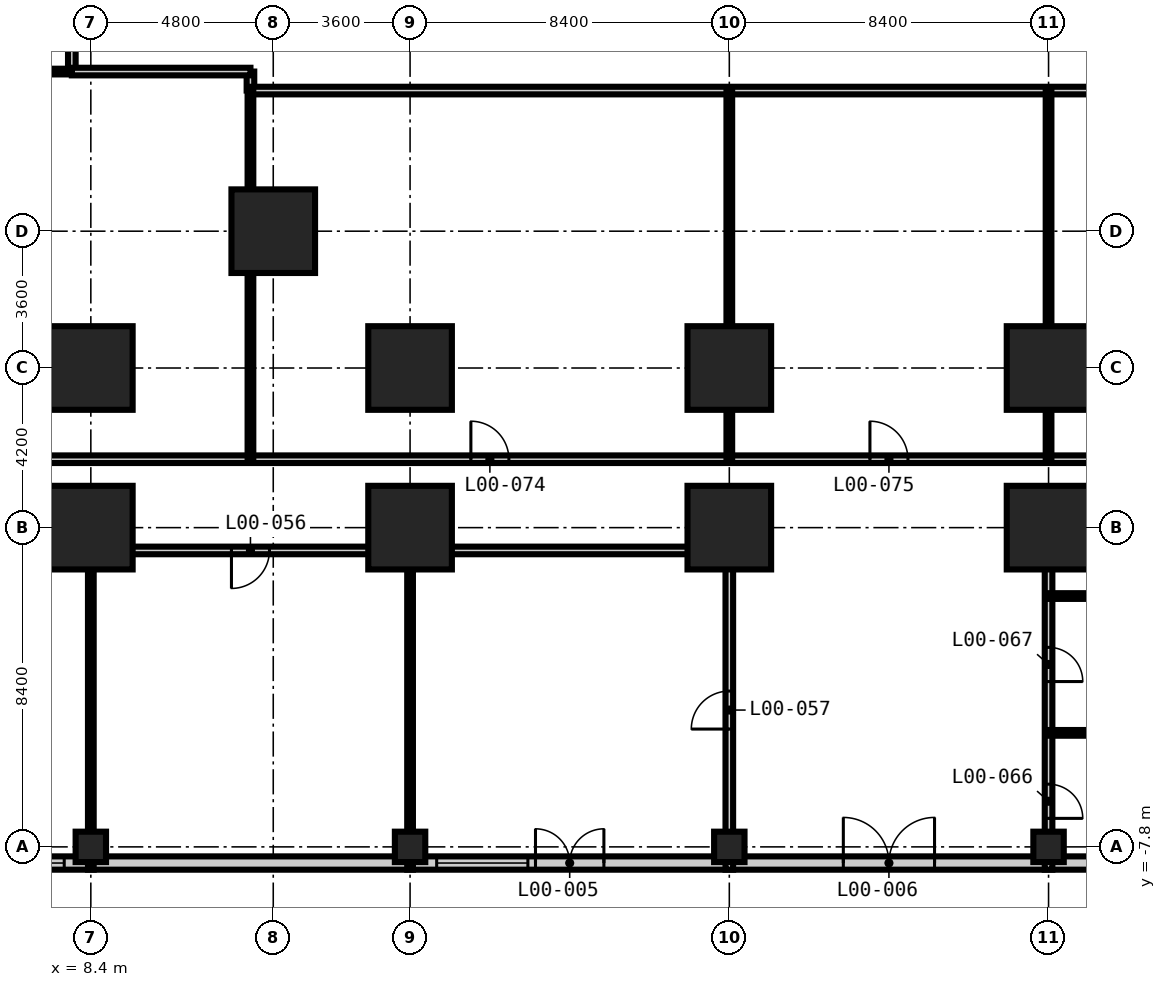
"""IFC4 building model, lengths in metres.
Left out: names, types, materials, properties, quantities, classifications, styles, units other than length and angle.
Written with IfcOpenShell. Run it as: python <this file> out.ifc"""

import sys

from ifc_helpers import new_model, si_unit, direction, frame, frame_2d, origin, origin_with_axes, origin_2d, place, context, subcontext, project, spatial, rectangle, extrude, element, fill, save


model = new_model("IFC4")
c1 = context("Model", 3, precision=1e-05, world=origin(), true_north=direction((0.0, 1.0)))
c2 = subcontext(c1, "Body", "Model", "MODEL_VIEW")
j1 = project(units=[si_unit("LENGTHUNIT", "METRE"), si_unit("PLANEANGLEUNIT", "RADIAN")], contexts=[c1])
p1 = place(None, origin())
s1 = spatial("IfcSite", under=j1, at=p1, CompositionType="ELEMENT")
p2 = place(p1, origin())
s2 = spatial("IfcBuilding", under=s1, at=p2, CompositionType="ELEMENT")
p3 = place(p2, origin())
s3 = spatial("IfcBuildingStorey", under=s2, at=p3, CompositionType="ELEMENT", Elevation=0.0)
for number, where, z_axis, x_axis in (
    (1, (8.4, 0.6, -0.3), (0.0, 0.0, 1.0), (1.0, 0.0, 0.0)),
    (2, (8.4, 4.8, -0.3), (0.0, 0.0, 1.0), (1.0, 0.0, 0.0)),
    (3, (13.2, 8.4, -0.3), (0.0, 0.0, 1.0), (1.0, 0.0, 0.0)),
    (4, (16.8, 0.6, -0.3), (0.0, 0.0, 1.0), (1.0, 0.0, 0.0)),
    (5, (16.8, 4.8, -0.3), (0.0, 0.0, 1.0), (1.0, 0.0, 0.0)),
    (6, (25.2, 0.6, -0.3), (0.0, 0.0, 1.0), (1.0, 0.0, 0.0)),
    (7, (25.2, 4.8, -0.3), (0.0, 0.0, 1.0), (1.0, 0.0, 0.0)),
    (8, (33.6, 0.6, -0.3), (0.0, 0.0, 1.0), (1.0, 0.0, 0.0)),
    (9, (33.6, 4.8, -0.3), (0.0, 0.0, 1.0), (1.0, 0.0, 0.0)),
):
    element("IfcColumn", number, at=place(p3, frame(where, z_axis=z_axis, x_axis=x_axis)), inside=s3, PredefinedType="COLUMN", context=c2, shape_type="SweptSolid", body=[
        extrude(rectangle(XDim=2.2, YDim=2.2, at=origin_2d()), origin(), (0.0, 0.0, 1.0), 6.0),
    ])
for number, where, z_axis, x_axis in (
    (10, (8.4, -7.8, -0.3), (0.0, 0.0, 1.0), (1.0, 0.0, 0.0)),
    (11, (16.8, -7.8, -0.3), (0.0, 0.0, 1.0), (1.0, 0.0, 0.0)),
    (12, (25.2, -7.8, -0.3), (0.0, 0.0, 1.0), (1.0, 0.0, 0.0)),
    (13, (33.6, -7.8, -0.3), (0.0, 0.0, 1.0), (1.0, 0.0, 0.0)),
):
    element("IfcColumn", number, at=place(p3, frame(where, z_axis=z_axis, x_axis=x_axis)), inside=s3, PredefinedType="COLUMN", context=c2, shape_type="SweptSolid", body=[
        extrude(rectangle(XDim=0.8, YDim=0.8, at=origin_2d()), origin(), (0.0, 0.0, 1.0), 6.0),
    ])
p4 = place(p3, frame((-33.6, -8.225, 0.0), z_axis=(0.0, 0.0, 1.0), x_axis=(1.0, 0.0, 0.0)))
e14 = element("IfcWall", 14, at=p4, inside=s3, PredefinedType="SOLIDWALL", context=c2, shape_type="SweptSolid", body=[
    extrude(rectangle(XDim=92.4, YDim=0.35, at=frame_2d((46.2, 0.0))), origin(), (0.0, 0.0, 1.0), 5.7),
])
p5 = place(p4, frame((5.4, 0.0, 0.0)))
e15 = element("IfcOpeningElement", 15, at=p5, cuts=e14, PredefinedType="OPENING", context=c2, shape_type="SweptSolid", body=[
    extrude(rectangle(XDim=1.8, YDim=2.7, at=frame_2d((0.9, 1.35))), frame((0.0, 0.185, 0.0), z_axis=(0.0, -1.0, 0.0), x_axis=(1.0, 0.0, 0.0)), (0.0, 0.0, 1.0), 0.37),
])
p6 = place(p4, frame((2.8, 0.0, 0.9)))
e16 = element("IfcOpeningElement", 16, at=p6, cuts=e14, PredefinedType="OPENING", context=c2, shape_type="SweptSolid", body=[
    extrude(rectangle(XDim=2.4, YDim=2.4, at=frame_2d((1.2, 1.2))), frame((0.0, 0.185, 0.0), z_axis=(0.0, -1.0, 0.0), x_axis=(1.0, 0.0, 0.0)), (0.0, 0.0, 1.0), 0.37),
])
p7 = place(p4, frame((9.3, 0.0, 0.9)))
e17 = element("IfcOpeningElement", 17, at=p7, cuts=e14, PredefinedType="OPENING", context=c2, shape_type="SweptSolid", body=[
    extrude(rectangle(XDim=2.4, YDim=2.4, at=frame_2d((1.2, 1.2))), frame((0.0, 0.185, 0.0), z_axis=(0.0, -1.0, 0.0), x_axis=(1.0, 0.0, 0.0)), (0.0, 0.0, 1.0), 0.37),
])
p8 = place(p4, frame((13.8, 0.0, 0.9)))
e18 = element("IfcOpeningElement", 18, at=p8, cuts=e14, PredefinedType="OPENING", context=c2, shape_type="SweptSolid", body=[
    extrude(rectangle(XDim=2.4, YDim=2.4, at=frame_2d((1.2, 1.2))), frame((0.0, 0.185, 0.0), z_axis=(0.0, -1.0, 0.0), x_axis=(1.0, 0.0, 0.0)), (0.0, 0.0, 1.0), 0.37),
])
p9 = place(p4, frame((19.3, 0.0, 0.0)))
e19 = element("IfcOpeningElement", 19, at=p9, cuts=e14, PredefinedType="OPENING", context=c2, shape_type="SweptSolid", body=[
    extrude(rectangle(XDim=1.2, YDim=2.4, at=frame_2d((0.6, 1.2))), frame((0.0, 0.185, 0.0), z_axis=(0.0, -1.0, 0.0), x_axis=(1.0, 0.0, 0.0)), (0.0, 0.0, 1.0), 0.37),
])
p10 = place(p4, frame((26.8, 0.0, 0.0)))
e20 = element("IfcOpeningElement", 20, at=p10, cuts=e14, PredefinedType="OPENING", context=c2, shape_type="SweptSolid", body=[
    extrude(rectangle(XDim=2.4, YDim=3.0, at=frame_2d((1.2, 1.5))), frame((0.0, 0.185, 0.0), z_axis=(0.0, -1.0, 0.0), x_axis=(1.0, 0.0, 0.0)), (0.0, 0.0, 1.0), 0.37),
])
p11 = place(p4, frame((36.9, 0.0, 0.0)))
e21 = element("IfcOpeningElement", 21, at=p11, cuts=e14, PredefinedType="OPENING", context=c2, shape_type="SweptSolid", body=[
    extrude(rectangle(XDim=1.8, YDim=2.4, at=frame_2d((0.9, 1.2))), frame((0.0, 0.185, 0.0), z_axis=(0.0, -1.0, 0.0), x_axis=(1.0, 0.0, 0.0)), (0.0, 0.0, 1.0), 0.37),
])
p12 = place(p4, frame((38.9, 0.0, 0.9)))
e22 = element("IfcOpeningElement", 22, at=p12, cuts=e14, PredefinedType="OPENING", context=c2, shape_type="SweptSolid", body=[
    extrude(rectangle(XDim=2.4, YDim=2.4, at=frame_2d((1.2, 1.2))), frame((0.0, 0.185, 0.0), z_axis=(0.0, -1.0, 0.0), x_axis=(1.0, 0.0, 0.0)), (0.0, 0.0, 1.0), 0.37),
])
p13 = place(p4, frame((53.7, 0.0, 0.0)))
e23 = element("IfcOpeningElement", 23, at=p13, cuts=e14, PredefinedType="OPENING", context=c2, shape_type="SweptSolid", body=[
    extrude(rectangle(XDim=1.8, YDim=2.4, at=frame_2d((0.9, 1.2))), frame((0.0, 0.185, 0.0), z_axis=(0.0, -1.0, 0.0), x_axis=(1.0, 0.0, 0.0)), (0.0, 0.0, 1.0), 0.37),
])
p14 = place(p4, frame((51.1, 0.0, 0.9)))
e24 = element("IfcOpeningElement", 24, at=p14, cuts=e14, PredefinedType="OPENING", context=c2, shape_type="SweptSolid", body=[
    extrude(rectangle(XDim=2.4, YDim=2.4, at=frame_2d((1.2, 1.2))), frame((0.0, 0.185, 0.0), z_axis=(0.0, -1.0, 0.0), x_axis=(1.0, 0.0, 0.0)), (0.0, 0.0, 1.0), 0.37),
])
p15 = place(p4, frame((61.8, 0.0, 0.0)))
e25 = element("IfcOpeningElement", 25, at=p15, cuts=e14, PredefinedType="OPENING", context=c2, shape_type="SweptSolid", body=[
    extrude(rectangle(XDim=2.4, YDim=3.0, at=frame_2d((1.2, 1.5))), frame((0.0, 0.185, 0.0), z_axis=(0.0, -1.0, 0.0), x_axis=(1.0, 0.0, 0.0)), (0.0, 0.0, 1.0), 0.37),
])
p16 = place(p4, frame((72.7, 0.0, 0.9)))
e26 = element("IfcOpeningElement", 26, at=p16, cuts=e14, PredefinedType="OPENING", context=c2, shape_type="SweptSolid", body=[
    extrude(rectangle(XDim=2.4, YDim=2.4, at=frame_2d((1.2, 1.2))), frame((0.0, 0.185, 0.0), z_axis=(0.0, -1.0, 0.0), x_axis=(1.0, 0.0, 0.0)), (0.0, 0.0, 1.0), 0.37),
])
p17 = place(p4, frame((81.1, 0.0, 0.9)))
e27 = element("IfcOpeningElement", 27, at=p17, cuts=e14, PredefinedType="OPENING", context=c2, shape_type="SweptSolid", body=[
    extrude(rectangle(XDim=2.4, YDim=2.4, at=frame_2d((1.2, 1.2))), frame((0.0, 0.185, 0.0), z_axis=(0.0, -1.0, 0.0), x_axis=(1.0, 0.0, 0.0)), (0.0, 0.0, 1.0), 0.37),
])
p18 = place(p4, frame((88.9, 0.0, 0.9)))
e28 = element("IfcOpeningElement", 28, at=p18, cuts=e14, PredefinedType="OPENING", context=c2, shape_type="SweptSolid", body=[
    extrude(rectangle(XDim=2.4, YDim=2.4, at=frame_2d((1.2, 1.2))), frame((0.0, 0.185, 0.0), z_axis=(0.0, -1.0, 0.0), x_axis=(1.0, 0.0, 0.0)), (0.0, 0.0, 1.0), 0.37),
])
p19 = place(p3, frame((7.9, 12.6, 0.0), z_axis=(0.0, 0.0, 1.0), x_axis=(0.0, 1.0, 0.0)))
e29 = element("IfcWall", 29, at=p19, inside=s3, PredefinedType="PARTITIONING", context=c2, shape_type="SweptSolid", body=[
    extrude(rectangle(XDim=8.4, YDim=0.2, at=frame_2d((4.2, 0.0))), origin(), (0.0, 0.0, 1.0), 5.7),
])
p20 = place(p19, frame((3.3, 0.0, 0.0)))
e30 = element("IfcOpeningElement", 30, at=p20, cuts=e29, PredefinedType="OPENING", context=c2, shape_type="SweptSolid", body=[
    extrude(rectangle(XDim=1.8, YDim=2.4, at=frame_2d((0.9, 1.2))), frame((0.0, 0.11, 0.0), z_axis=(0.0, -1.0, 0.0), x_axis=(1.0, 0.0, 0.0)), (0.0, 0.0, 1.0), 0.22),
])
p21 = place(p3, frame((12.6, 12.1, 0.0), z_axis=(0.0, 0.0, 1.0), x_axis=(0.0, 1.0, 0.0)))
e31 = element("IfcWall", 31, at=p21, inside=s3, PredefinedType="PARTITIONING", context=c2, shape_type="SweptSolid", body=[
    extrude(rectangle(XDim=0.5, YDim=0.2, at=frame_2d((0.25, 0.0))), origin(), (0.0, 0.0, 1.0), 5.7),
])
p22 = place(p3, frame((25.2, -8.4, 0.0), z_axis=(0.0, 0.0, 1.0), x_axis=(0.0, 1.0, 0.0)))
e32 = element("IfcWall", 32, at=p22, inside=s3, PredefinedType="PARTITIONING", context=c2, shape_type="SweptSolid", body=[
    extrude(rectangle(XDim=8.4, YDim=0.2, at=frame_2d((4.2, 0.0))), origin(), (0.0, 0.0, 1.0), 5.7),
])
p23 = place(p22, frame((3.7, 0.0, 0.0)))
e33 = element("IfcOpeningElement", 33, at=p23, cuts=e32, PredefinedType="OPENING", context=c2, shape_type="SweptSolid", body=[
    extrude(rectangle(XDim=1.0, YDim=2.1, at=frame_2d((0.5, 1.05))), frame((0.0, 0.11, 0.0), z_axis=(0.0, -1.0, 0.0), x_axis=(1.0, 0.0, 0.0)), (0.0, 0.0, 1.0), 0.22),
])
p24 = place(p3, frame((33.6, -8.4, 0.0), z_axis=(0.0, 0.0, 1.0), x_axis=(0.0, 1.0, 0.0)))
e34 = element("IfcWall", 34, at=p24, inside=s3, PredefinedType="PARTITIONING", context=c2, shape_type="SweptSolid", body=[
    extrude(rectangle(XDim=9.6, YDim=0.2, at=frame_2d((4.8, 0.0))), origin(), (0.0, 0.0, 1.0), 5.7),
])
p25 = place(p24, frame((1.35, 0.0, 0.0)))
e35 = element("IfcOpeningElement", 35, at=p25, cuts=e34, PredefinedType="OPENING", context=c2, shape_type="SweptSolid", body=[
    extrude(rectangle(XDim=0.9, YDim=2.1, at=frame_2d((0.45, 1.05))), frame((0.0, 0.11, 0.0), z_axis=(0.0, -1.0, 0.0), x_axis=(1.0, 0.0, 0.0)), (0.0, 0.0, 1.0), 0.22),
])
p26 = place(p24, frame((4.95, 0.0, 0.0)))
e36 = element("IfcOpeningElement", 36, at=p26, cuts=e34, PredefinedType="OPENING", context=c2, shape_type="SweptSolid", body=[
    extrude(rectangle(XDim=0.9, YDim=2.1, at=frame_2d((0.45, 1.05))), frame((0.0, 0.11, 0.0), z_axis=(0.0, -1.0, 0.0), x_axis=(1.0, 0.0, 0.0)), (0.0, 0.0, 1.0), 0.22),
])
p27 = place(p3, origin_with_axes())
e37 = element("IfcWall", 37, at=p27, inside=s3, PredefinedType="PARTITIONING", context=c2, shape_type="SweptSolid", body=[
    extrude(rectangle(XDim=25.2, YDim=0.2, at=frame_2d((12.6, 0.0))), origin(), (0.0, 0.0, 1.0), 5.7),
])
p28 = place(p27, frame((3.7, 0.0, 0.0)))
e38 = element("IfcOpeningElement", 38, at=p28, cuts=e37, PredefinedType="OPENING", context=c2, shape_type="SweptSolid", body=[
    extrude(rectangle(XDim=1.0, YDim=2.1, at=frame_2d((0.5, 1.05))), frame((0.0, 0.11, 0.0), z_axis=(0.0, -1.0, 0.0), x_axis=(1.0, 0.0, 0.0)), (0.0, 0.0, 1.0), 0.22),
])
p29 = place(p27, frame((12.1, 0.0, 0.0)))
e39 = element("IfcOpeningElement", 39, at=p29, cuts=e37, PredefinedType="OPENING", context=c2, shape_type="SweptSolid", body=[
    extrude(rectangle(XDim=1.0, YDim=2.1, at=frame_2d((0.5, 1.05))), frame((0.0, 0.11, 0.0), z_axis=(0.0, -1.0, 0.0), x_axis=(1.0, 0.0, 0.0)), (0.0, 0.0, 1.0), 0.22),
])
p30 = place(p3, frame((33.6, 1.2, 0.0), z_axis=(0.0, 0.0, 1.0), x_axis=(1.0, 0.0, 0.0)))
e40 = element("IfcWall", 40, at=p30, inside=s3, PredefinedType="PARTITIONING", context=c2, shape_type="SweptSolid", body=[
    extrude(rectangle(XDim=4.2, YDim=0.2, at=frame_2d((2.1, 0.0))), origin(), (0.0, 0.0, 1.0), 5.7),
])
p31 = place(p30, frame((1.6, 0.0, 0.0)))
e41 = element("IfcOpeningElement", 41, at=p31, cuts=e40, PredefinedType="OPENING", context=c2, shape_type="SweptSolid", body=[
    extrude(rectangle(XDim=1.0, YDim=2.1, at=frame_2d((0.5, 1.05))), frame((0.0, 0.11, 0.0), z_axis=(0.0, -1.0, 0.0), x_axis=(1.0, 0.0, 0.0)), (0.0, 0.0, 1.0), 0.22),
])
p32 = place(p3, frame((0.0, 2.4, 0.0), z_axis=(0.0, 0.0, 1.0), x_axis=(1.0, 0.0, 0.0)))
e42 = element("IfcWall", 42, at=p32, inside=s3, PredefinedType="PARTITIONING", context=c2, shape_type="SweptSolid", body=[
    extrude(rectangle(XDim=54.6, YDim=0.2, at=frame_2d((27.3, 0.0))), origin(), (0.0, 0.0, 1.0), 5.7),
])
p33 = place(p32, frame((5.8, 0.0, 0.0)))
e43 = element("IfcOpeningElement", 43, at=p33, cuts=e42, PredefinedType="OPENING", context=c2, shape_type="SweptSolid", body=[
    extrude(rectangle(XDim=1.0, YDim=2.1, at=frame_2d((0.5, 1.05))), frame((0.0, 0.11, 0.0), z_axis=(0.0, -1.0, 0.0), x_axis=(1.0, 0.0, 0.0)), (0.0, 0.0, 1.0), 0.22),
])
p34 = place(p32, frame((18.4, 0.0, 0.0)))
e44 = element("IfcOpeningElement", 44, at=p34, cuts=e42, PredefinedType="OPENING", context=c2, shape_type="SweptSolid", body=[
    extrude(rectangle(XDim=1.0, YDim=2.1, at=frame_2d((0.5, 1.05))), frame((0.0, 0.11, 0.0), z_axis=(0.0, -1.0, 0.0), x_axis=(1.0, 0.0, 0.0)), (0.0, 0.0, 1.0), 0.22),
])
p35 = place(p32, frame((28.9, 0.0, 0.0)))
e45 = element("IfcOpeningElement", 45, at=p35, cuts=e42, PredefinedType="OPENING", context=c2, shape_type="SweptSolid", body=[
    extrude(rectangle(XDim=1.0, YDim=2.1, at=frame_2d((0.5, 1.05))), frame((0.0, 0.11, 0.0), z_axis=(0.0, -1.0, 0.0), x_axis=(1.0, 0.0, 0.0)), (0.0, 0.0, 1.0), 0.22),
])
p36 = place(p32, frame((37.3, 0.0, 0.0)))
e46 = element("IfcOpeningElement", 46, at=p36, cuts=e42, PredefinedType="OPENING", context=c2, shape_type="SweptSolid", body=[
    extrude(rectangle(XDim=1.0, YDim=2.1, at=frame_2d((0.5, 1.05))), frame((0.0, 0.11, 0.0), z_axis=(0.0, -1.0, 0.0), x_axis=(1.0, 0.0, 0.0)), (0.0, 0.0, 1.0), 0.22),
])
p37 = place(p3, frame((12.6, 12.1, 0.0), z_axis=(0.0, 0.0, 1.0), x_axis=(1.0, 0.0, 0.0)))
e47 = element("IfcWall", 47, at=p37, inside=s3, PredefinedType="PARTITIONING", context=c2, shape_type="SweptSolid", body=[
    extrude(rectangle(XDim=33.6, YDim=0.2, at=frame_2d((16.8, 0.0))), origin(), (0.0, 0.0, 1.0), 5.7),
])
p38 = place(p3, frame((7.9, 12.6, 0.0), z_axis=(0.0, 0.0, 1.0), x_axis=(1.0, 0.0, 0.0)))
e48 = element("IfcWall", 48, at=p38, inside=s3, PredefinedType="PARTITIONING", context=c2, shape_type="SweptSolid", body=[
    extrude(rectangle(XDim=4.7, YDim=0.2, at=frame_2d((2.35, 0.0))), origin(), (0.0, 0.0, 1.0), 5.7),
])
p39 = place(p3, frame((8.4, -8.4, 0.0), z_axis=(0.0, 0.0, 1.0), x_axis=(0.0, 1.0, 0.0)))
e49 = element("IfcWall", 49, at=p39, inside=s3, PredefinedType="PARTITIONING", context=c2, shape_type="SweptSolid", body=[
    extrude(rectangle(XDim=8.4, YDim=0.15, at=frame_2d((4.2, 0.0))), origin(), (0.0, 0.0, 1.0), 5.7),
])
p40 = place(p3, frame((12.6, 2.4, 0.0), z_axis=(0.0, 0.0, 1.0), x_axis=(0.0, 1.0, 0.0)))
e50 = element("IfcWall", 50, at=p40, inside=s3, PredefinedType="PARTITIONING", context=c2, shape_type="SweptSolid", body=[
    extrude(rectangle(XDim=9.7, YDim=0.15, at=frame_2d((4.85, 0.0))), origin(), (0.0, 0.0, 1.0), 5.7),
])
p41 = place(p3, frame((16.8, -8.4, 0.0), z_axis=(0.0, 0.0, 1.0), x_axis=(0.0, 1.0, 0.0)))
e51 = element("IfcWall", 51, at=p41, inside=s3, PredefinedType="PARTITIONING", context=c2, shape_type="SweptSolid", body=[
    extrude(rectangle(XDim=8.4, YDim=0.15, at=frame_2d((4.2, 0.0))), origin(), (0.0, 0.0, 1.0), 5.7),
])
for number, where, z_axis, x_axis in (
    (52, (25.2, 2.4, 0.0), (0.0, 0.0, 1.0), (0.0, 1.0, 0.0)),
    (53, (33.6, 2.4, 0.0), (0.0, 0.0, 1.0), (0.0, 1.0, 0.0)),
):
    element("IfcWall", number, at=place(p3, frame(where, z_axis=z_axis, x_axis=x_axis)), inside=s3, PredefinedType="PARTITIONING", context=c2, shape_type="SweptSolid", body=[
        extrude(rectangle(XDim=9.7, YDim=0.15, at=frame_2d((4.85, 0.0))), origin(), (0.0, 0.0, 1.0), 5.7),
    ])
for number, where, z_axis, x_axis in (
    (54, (33.6, -4.8, 0.0), (0.0, 0.0, 1.0), (1.0, 0.0, 0.0)),
    (55, (33.6, -1.2, 0.0), (0.0, 0.0, 1.0), (1.0, 0.0, 0.0)),
):
    element("IfcWall", number, at=place(p3, frame(where, z_axis=z_axis, x_axis=x_axis)), inside=s3, PredefinedType="PARTITIONING", context=c2, shape_type="SweptSolid", body=[
        extrude(rectangle(XDim=4.2, YDim=0.15, at=frame_2d((2.1, 0.0))), origin(), (0.0, 0.0, 1.0), 5.7),
    ])
p42 = place(p3, frame((0.0, 12.6, 0.0), z_axis=(0.0, 0.0, 1.0), x_axis=(1.0, 0.0, 0.0)))
e56 = element("IfcWall", 56, at=p42, inside=s3, PredefinedType="PARTITIONING", context=c2, shape_type="SweptSolid", body=[
    extrude(rectangle(XDim=7.9, YDim=0.15, at=frame_2d((3.95, 0.0))), origin(), (0.0, 0.0, 1.0), 5.7),
])
p43 = place(p12, origin())
e57 = element("IfcWindow", 57, at=p43, inside=s3, PartitioningType="SINGLE_PANEL", PredefinedType="WINDOW", context=c2, shape_type="SweptSolid", body=[
    extrude(rectangle(XDim=2.4, YDim=2.4, at=frame_2d((1.2, 1.2))), frame((0.0, 0.03, 0.0), z_axis=(0.0, -1.0, 0.0), x_axis=(1.0, 0.0, 0.0)), (0.0, 0.0, 1.0), 0.06),
])
fill(e22, e57)
p44 = place(p13, origin())
e58 = element("IfcDoor", 58, at=p44, inside=s3, OperationType="DOUBLE_DOOR_DOUBLE_SWING", PredefinedType="DOOR", context=c2, shape_type="SweptSolid", body=[
    extrude(rectangle(XDim=1.8, YDim=2.4, at=frame_2d((0.9, 1.2))), frame((0.0, 0.025, 0.0), z_axis=(0.0, -1.0, 0.0), x_axis=(1.0, 0.0, 0.0)), (0.0, 0.0, 1.0), 0.05),
])
fill(e23, e58)
p45 = place(p14, origin())
e59 = element("IfcWindow", 59, at=p45, inside=s3, PartitioningType="SINGLE_PANEL", PredefinedType="WINDOW", context=c2, shape_type="SweptSolid", body=[
    extrude(rectangle(XDim=2.4, YDim=2.4, at=frame_2d((1.2, 1.2))), frame((0.0, 0.03, 0.0), z_axis=(0.0, -1.0, 0.0), x_axis=(1.0, 0.0, 0.0)), (0.0, 0.0, 1.0), 0.06),
])
fill(e24, e59)
p46 = place(p15, origin())
e60 = element("IfcDoor", 60, at=p46, inside=s3, OperationType="DOUBLE_DOOR_DOUBLE_SWING", PredefinedType="DOOR", context=c2, shape_type="SweptSolid", body=[
    extrude(rectangle(XDim=2.4, YDim=3.0, at=frame_2d((1.2, 1.5))), frame((0.0, 0.025, 0.0), z_axis=(0.0, -1.0, 0.0), x_axis=(1.0, 0.0, 0.0)), (0.0, 0.0, 1.0), 0.05),
])
fill(e25, e60)
p47 = place(p29, frame((1.0, 0.0, 0.0), z_axis=(0.0, 0.0, 1.0), x_axis=(-1.0, 0.0, 0.0)))
e61 = element("IfcDoor", 61, at=p47, inside=s3, OperationType="SINGLE_SWING_RIGHT", PredefinedType="DOOR", context=c2, shape_type="SweptSolid", body=[
    extrude(rectangle(XDim=1.0, YDim=2.1, at=frame_2d((0.5, 1.05))), frame((0.0, 0.025, 0.0), z_axis=(0.0, -1.0, 0.0), x_axis=(1.0, 0.0, 0.0)), (0.0, 0.0, 1.0), 0.05),
])
fill(e39, e61)
p48 = place(p23, origin())
e62 = element("IfcDoor", 62, at=p48, inside=s3, OperationType="SINGLE_SWING_LEFT", PredefinedType="DOOR", context=c2, shape_type="SweptSolid", body=[
    extrude(rectangle(XDim=1.0, YDim=2.1, at=frame_2d((0.5, 1.05))), frame((0.0, 0.025, 0.0), z_axis=(0.0, -1.0, 0.0), x_axis=(1.0, 0.0, 0.0)), (0.0, 0.0, 1.0), 0.05),
])
fill(e33, e62)
p49 = place(p25, frame((0.9, 0.0, 0.0), z_axis=(0.0, 0.0, 1.0), x_axis=(-1.0, 0.0, 0.0)))
e63 = element("IfcDoor", 63, at=p49, inside=s3, OperationType="SINGLE_SWING_RIGHT", PredefinedType="DOOR", context=c2, shape_type="SweptSolid", body=[
    extrude(rectangle(XDim=0.9, YDim=2.1, at=frame_2d((0.45, 1.05))), frame((0.0, 0.025, 0.0), z_axis=(0.0, -1.0, 0.0), x_axis=(1.0, 0.0, 0.0)), (0.0, 0.0, 1.0), 0.05),
])
fill(e35, e63)
p50 = place(p26, frame((0.9, 0.0, 0.0), z_axis=(0.0, 0.0, 1.0), x_axis=(-1.0, 0.0, 0.0)))
e64 = element("IfcDoor", 64, at=p50, inside=s3, OperationType="SINGLE_SWING_RIGHT", PredefinedType="DOOR", context=c2, shape_type="SweptSolid", body=[
    extrude(rectangle(XDim=0.9, YDim=2.1, at=frame_2d((0.45, 1.05))), frame((0.0, 0.025, 0.0), z_axis=(0.0, -1.0, 0.0), x_axis=(1.0, 0.0, 0.0)), (0.0, 0.0, 1.0), 0.05),
])
fill(e36, e64)
p51 = place(p34, origin())
e65 = element("IfcDoor", 65, at=p51, inside=s3, OperationType="SINGLE_SWING_LEFT", PredefinedType="DOOR", context=c2, shape_type="SweptSolid", body=[
    extrude(rectangle(XDim=1.0, YDim=2.1, at=frame_2d((0.5, 1.05))), frame((0.0, 0.025, 0.0), z_axis=(0.0, -1.0, 0.0), x_axis=(1.0, 0.0, 0.0)), (0.0, 0.0, 1.0), 0.05),
])
fill(e44, e65)
p52 = place(p35, origin())
e66 = element("IfcDoor", 66, at=p52, inside=s3, OperationType="SINGLE_SWING_LEFT", PredefinedType="DOOR", context=c2, shape_type="SweptSolid", body=[
    extrude(rectangle(XDim=1.0, YDim=2.1, at=frame_2d((0.5, 1.05))), frame((0.0, 0.025, 0.0), z_axis=(0.0, -1.0, 0.0), x_axis=(1.0, 0.0, 0.0)), (0.0, 0.0, 1.0), 0.05),
])
fill(e45, e66)
save(model, sys.argv[1])
